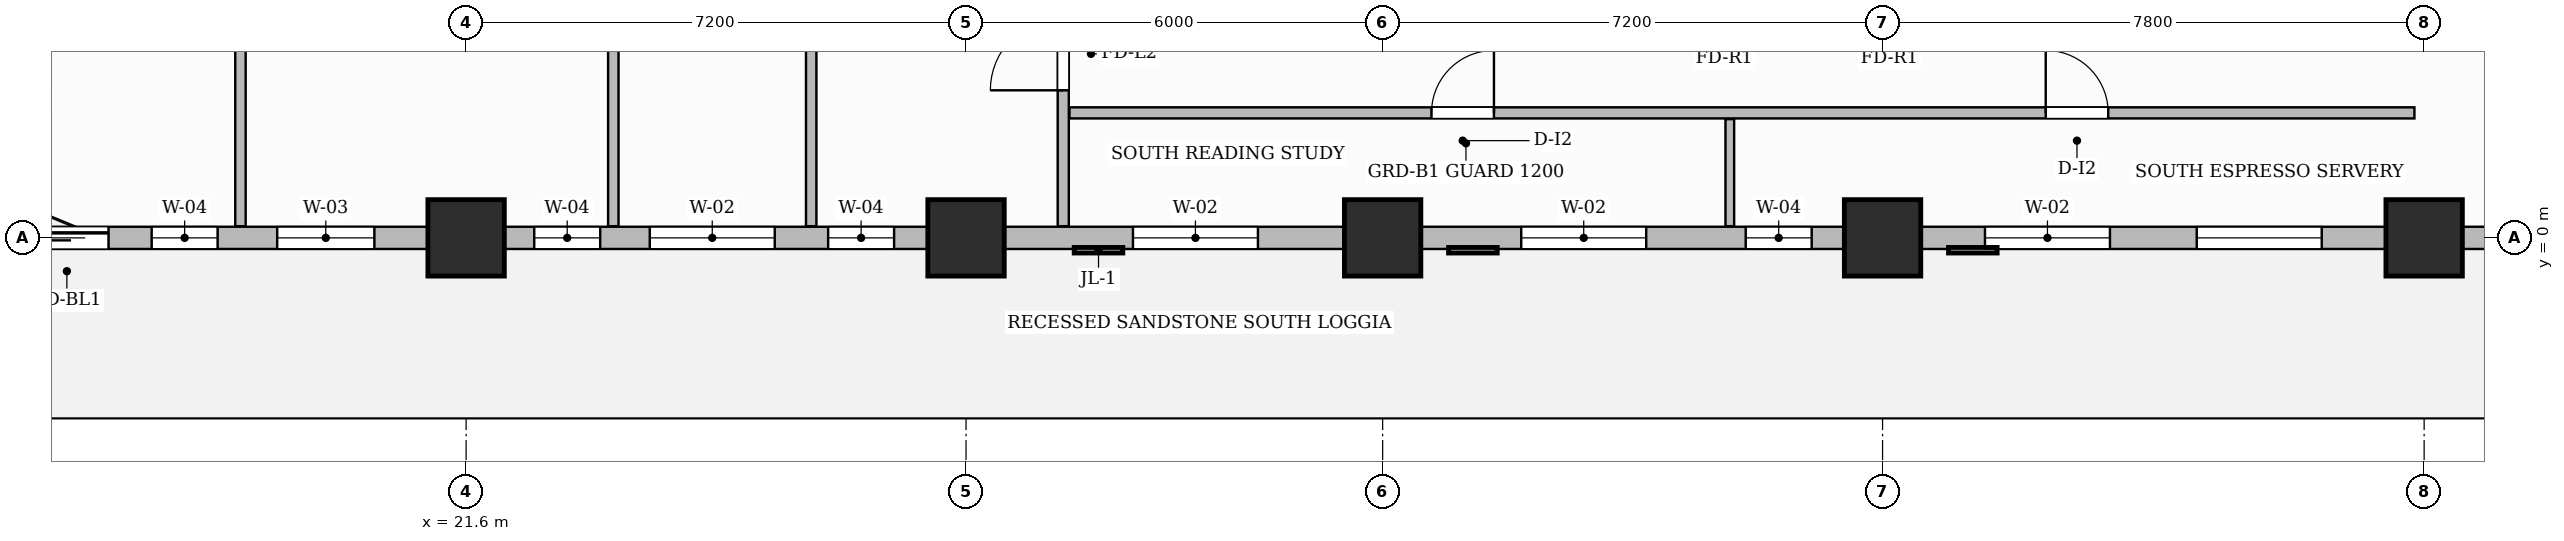
"""IFC4 building model, lengths in metres.
Left out: names, types, materials, properties, quantities, classifications, styles, units other than length and angle.
Written with IfcOpenShell. Run it as: python <this file> out.ifc"""

import sys

from ifc_helpers import new_model, si_unit, direction, frame, frame_2d, origin, origin_2d, place, context, subcontext, project, spatial, rectangle, extrude, source, transform, mapped, element, fill, save


model = new_model("IFC4")
c1 = context("Model", 3, precision=1e-05, world=origin(), true_north=direction((0.0, 1.0)))
c2 = subcontext(c1, "Body", "Model", "MODEL_VIEW")
j1 = project(units=[si_unit("LENGTHUNIT", "METRE"), si_unit("PLANEANGLEUNIT", "RADIAN")], contexts=[c1])
p1 = place(None, origin())
s1 = spatial("IfcSite", under=j1, at=p1, CompositionType="ELEMENT")
p2 = place(p1, origin())
s2 = spatial("IfcBuilding", under=s1, at=p2, CompositionType="ELEMENT")
p3 = place(p2, frame((0.0, 0.0, 69.4)))
s3 = spatial("IfcBuildingStorey", under=s2, at=p3, CompositionType="ELEMENT", Elevation=69.4)
m1 = source(origin(), c2, "Body", "SweptSolid", [
    extrude(rectangle(XDim=1.1, YDim=1.1, at=origin_2d()), origin(), (0.0, 0.0, 1.0), 3.7),
])
for number, where, z_axis, x_axis in (
    (1, (21.6, 0.0, 0.0), (0.0, 0.0, 1.0), (1.0, 0.0, 0.0)),
    (2, (28.8, 0.0, 0.0), (0.0, 0.0, 1.0), (1.0, 0.0, 0.0)),
    (3, (34.8, 0.0, 0.0), (0.0, 0.0, 1.0), (1.0, 0.0, 0.0)),
    (4, (42.0, 0.0, 0.0), (0.0, 0.0, 1.0), (1.0, 0.0, 0.0)),
    (5, (49.8, 0.0, 0.0), (0.0, 0.0, 1.0), (1.0, 0.0, 0.0)),
):
    element("IfcColumn", number, at=place(p3, frame(where, z_axis=z_axis, x_axis=x_axis)), inside=s3, PredefinedType="COLUMN", context=c2, shape_type="MappedRepresentation", body=[
        mapped(m1, transform((0.0, 0.0, 0.0), scale=1.0)),
    ])
p4 = place(p3, frame((30.2, 0.168, 0.0), z_axis=(0.0, 0.0, 1.0), x_axis=(0.0, 1.0, 0.0)))
e6 = element("IfcWall", 6, at=p4, inside=s3, PredefinedType="PARTITIONING", context=c2, shape_type="SweptSolid", body=[
    extrude(rectangle(XDim=9.892, YDim=0.16, at=frame_2d((4.946, 0.0))), origin(), (0.0, 0.0, 1.0), 3.45),
])
p5 = place(p4, frame((1.957, 0.0, 0.0)))
e7 = element("IfcOpeningElement", 7, at=p5, cuts=e6, PredefinedType="OPENING", context=c2, shape_type="SweptSolid", body=[
    extrude(rectangle(XDim=1.05, YDim=2.15, at=frame_2d((0.525, 1.075))), frame((0.0, 0.09, 0.0), z_axis=(0.0, -1.0, 0.0), x_axis=(1.0, 0.0, 0.0)), (0.0, 0.0, 1.0), 0.18),
])
p6 = place(p3, frame((30.29, 1.8, 0.0), z_axis=(0.0, 0.0, 1.0), x_axis=(1.0, 0.0, 0.0)))
e8 = element("IfcWall", 8, at=p6, inside=s3, PredefinedType="PARTITIONING", context=c2, shape_type="SweptSolid", body=[
    extrude(rectangle(XDim=19.37, YDim=0.16, at=frame_2d((9.685, 0.0))), origin(), (0.0, 0.0, 1.0), 3.45),
])
p7 = place(p6, frame((5.213, 0.0, 0.0)))
e9 = element("IfcOpeningElement", 9, at=p7, cuts=e8, PredefinedType="OPENING", context=c2, shape_type="SweptSolid", body=[
    extrude(rectangle(XDim=0.9, YDim=2.15, at=frame_2d((0.45, 1.075))), frame((0.0, 0.09, 0.0), z_axis=(0.0, -1.0, 0.0), x_axis=(1.0, 0.0, 0.0)), (0.0, 0.0, 1.0), 0.18),
])
p8 = place(p6, frame((14.06, 0.0, 0.0)))
e10 = element("IfcOpeningElement", 10, at=p8, cuts=e8, PredefinedType="OPENING", context=c2, shape_type="SweptSolid", body=[
    extrude(rectangle(XDim=0.9, YDim=2.15, at=frame_2d((0.45, 1.075))), frame((0.0, 0.09, 0.0), z_axis=(0.0, -1.0, 0.0), x_axis=(1.0, 0.0, 0.0)), (0.0, 0.0, 1.0), 0.18),
])
p9 = place(p3, frame((39.8, 0.168, 0.0), z_axis=(0.0, 0.0, 1.0), x_axis=(0.0, 1.0, 0.0)))
e11 = element("IfcWall", 11, at=p9, inside=s3, PredefinedType="PARTITIONING", context=c2, shape_type="SweptSolid", body=[
    extrude(rectangle(XDim=1.542, YDim=0.125, at=frame_2d((0.771, 0.0))), origin(), (0.0, 0.0, 1.0), 3.45),
])
for number, where, z_axis, x_axis in (
    (12, (18.35, 0.168, 0.0), (0.0, 0.0, 1.0), (0.0, 1.0, 0.0)),
    (13, (23.72, 0.168, 0.0), (0.0, 0.0, 1.0), (0.0, 1.0, 0.0)),
    (14, (26.57, 0.168, 0.0), (0.0, 0.0, 1.0), (0.0, 1.0, 0.0)),
):
    element("IfcWall", number, at=place(p3, frame(where, z_axis=z_axis, x_axis=x_axis)), inside=s3, PredefinedType="PARTITIONING", context=c2, shape_type="SweptSolid", body=[
        extrude(rectangle(XDim=9.892, YDim=0.15, at=frame_2d((4.946, 0.0))), origin(), (0.0, 0.0, 1.0), 3.45),
    ])
p10 = place(p3, frame((14.4, 0.0, 0.0), z_axis=(0.0, 0.0, 1.0), x_axis=(1.0, 0.0, 0.0)))
e15 = element("IfcWall", 15, at=p10, inside=s3, PredefinedType="SOLIDWALL", context=c2, shape_type="SweptSolid", body=[
    extrude(rectangle(XDim=43.2, YDim=0.32, at=frame_2d((21.6, 0.0))), origin(), (0.0, 0.0, 1.0), 2.885),
])
p11 = place(p10, frame((0.85, 0.0, 0.0)))
e16 = element("IfcOpeningElement", 16, at=p11, cuts=e15, PredefinedType="OPENING", context=c2, shape_type="SweptSolid", body=[
    extrude(rectangle(XDim=1.2, YDim=2.2, at=frame_2d((0.6, 1.1))), frame((0.0, 0.17, 0.0), z_axis=(0.0, -1.0, 0.0), x_axis=(1.0, 0.0, 0.0)), (0.0, 0.0, 1.0), 0.34),
])
p12 = place(p10, frame((2.671, 0.0, 0.8)))
e17 = element("IfcOpeningElement", 17, at=p12, cuts=e15, PredefinedType="OPENING", context=c2, shape_type="SweptSolid", body=[
    extrude(rectangle(XDim=0.95, YDim=1.75, at=frame_2d((0.475, 0.875))), frame((0.0, 0.17, 0.0), z_axis=(0.0, -1.0, 0.0), x_axis=(1.0, 0.0, 0.0)), (0.0, 0.0, 1.0), 0.34),
])
p13 = place(p10, frame((4.479, 0.0, 0.8)))
e18 = element("IfcOpeningElement", 18, at=p13, cuts=e15, PredefinedType="OPENING", context=c2, shape_type="SweptSolid", body=[
    extrude(rectangle(XDim=1.4, YDim=1.85, at=frame_2d((0.7, 0.925))), frame((0.0, 0.17, 0.0), z_axis=(0.0, -1.0, 0.0), x_axis=(1.0, 0.0, 0.0)), (0.0, 0.0, 1.0), 0.34),
])
p14 = place(p10, frame((8.181, 0.0, 0.8)))
e19 = element("IfcOpeningElement", 19, at=p14, cuts=e15, PredefinedType="OPENING", context=c2, shape_type="SweptSolid", body=[
    extrude(rectangle(XDim=0.95, YDim=1.75, at=frame_2d((0.475, 0.875))), frame((0.0, 0.17, 0.0), z_axis=(0.0, -1.0, 0.0), x_axis=(1.0, 0.0, 0.0)), (0.0, 0.0, 1.0), 0.34),
])
p15 = place(p10, frame((9.845, 0.0, 0.8)))
e20 = element("IfcOpeningElement", 20, at=p15, cuts=e15, PredefinedType="OPENING", context=c2, shape_type="SweptSolid", body=[
    extrude(rectangle(XDim=1.8, YDim=1.85, at=frame_2d((0.9, 0.925))), frame((0.0, 0.17, 0.0), z_axis=(0.0, -1.0, 0.0), x_axis=(1.0, 0.0, 0.0)), (0.0, 0.0, 1.0), 0.34),
])
p16 = place(p10, frame((12.414, 0.0, 0.8)))
e21 = element("IfcOpeningElement", 21, at=p16, cuts=e15, PredefinedType="OPENING", context=c2, shape_type="SweptSolid", body=[
    extrude(rectangle(XDim=0.95, YDim=1.75, at=frame_2d((0.475, 0.875))), frame((0.0, 0.17, 0.0), z_axis=(0.0, -1.0, 0.0), x_axis=(1.0, 0.0, 0.0)), (0.0, 0.0, 1.0), 0.34),
])
p17 = place(p10, frame((16.804, 0.0, 0.8)))
e22 = element("IfcOpeningElement", 22, at=p17, cuts=e15, PredefinedType="OPENING", context=c2, shape_type="SweptSolid", body=[
    extrude(rectangle(XDim=1.8, YDim=1.85, at=frame_2d((0.9, 0.925))), frame((0.0, 0.17, 0.0), z_axis=(0.0, -1.0, 0.0), x_axis=(1.0, 0.0, 0.0)), (0.0, 0.0, 1.0), 0.34),
])
p18 = place(p10, frame((22.396, 0.0, 0.8)))
e23 = element("IfcOpeningElement", 23, at=p18, cuts=e15, PredefinedType="OPENING", context=c2, shape_type="SweptSolid", body=[
    extrude(rectangle(XDim=1.8, YDim=1.85, at=frame_2d((0.9, 0.925))), frame((0.0, 0.17, 0.0), z_axis=(0.0, -1.0, 0.0), x_axis=(1.0, 0.0, 0.0)), (0.0, 0.0, 1.0), 0.34),
])
p19 = place(p10, frame((25.629, 0.0, 0.8)))
e24 = element("IfcOpeningElement", 24, at=p19, cuts=e15, PredefinedType="OPENING", context=c2, shape_type="SweptSolid", body=[
    extrude(rectangle(XDim=0.95, YDim=1.75, at=frame_2d((0.475, 0.875))), frame((0.0, 0.17, 0.0), z_axis=(0.0, -1.0, 0.0), x_axis=(1.0, 0.0, 0.0)), (0.0, 0.0, 1.0), 0.34),
])
p20 = place(p10, frame((29.075, 0.0, 0.8)))
e25 = element("IfcOpeningElement", 25, at=p20, cuts=e15, PredefinedType="OPENING", context=c2, shape_type="SweptSolid", body=[
    extrude(rectangle(XDim=1.8, YDim=1.85, at=frame_2d((0.9, 0.925))), frame((0.0, 0.17, 0.0), z_axis=(0.0, -1.0, 0.0), x_axis=(1.0, 0.0, 0.0)), (0.0, 0.0, 1.0), 0.34),
])
p21 = place(p10, frame((32.125, 0.0, 0.8)))
e26 = element("IfcOpeningElement", 26, at=p21, cuts=e15, PredefinedType="OPENING", context=c2, shape_type="SweptSolid", body=[
    extrude(rectangle(XDim=1.8, YDim=1.85, at=frame_2d((0.9, 0.925))), frame((0.0, 0.17, 0.0), z_axis=(0.0, -1.0, 0.0), x_axis=(1.0, 0.0, 0.0)), (0.0, 0.0, 1.0), 0.34),
])
p22 = place(p10, frame((36.946, 0.0, 0.8)))
e27 = element("IfcOpeningElement", 27, at=p22, cuts=e15, PredefinedType="OPENING", context=c2, shape_type="SweptSolid", body=[
    extrude(rectangle(XDim=1.8, YDim=1.85, at=frame_2d((0.9, 0.925))), frame((0.0, 0.17, 0.0), z_axis=(0.0, -1.0, 0.0), x_axis=(1.0, 0.0, 0.0)), (0.0, 0.0, 1.0), 0.34),
])
p23 = place(p10, frame((40.054, 0.0, 0.8)))
e28 = element("IfcOpeningElement", 28, at=p23, cuts=e15, PredefinedType="OPENING", context=c2, shape_type="SweptSolid", body=[
    extrude(rectangle(XDim=1.8, YDim=1.85, at=frame_2d((0.9, 0.925))), frame((0.0, 0.17, 0.0), z_axis=(0.0, -1.0, 0.0), x_axis=(1.0, 0.0, 0.0)), (0.0, 0.0, 1.0), 0.34),
])
m2 = source(origin(), c2, "Body", "SweptSolid", [
    extrude(rectangle(XDim=1.05, YDim=2.15, at=frame_2d((0.525, 1.075))), frame((0.0, 0.025, 0.0), z_axis=(0.0, -1.0, 0.0), x_axis=(1.0, 0.0, 0.0)), (0.0, 0.0, 1.0), 0.05),
])
p24 = place(p5, origin())
e29 = element("IfcDoor", 29, at=p24, inside=s3, OperationType="SINGLE_SWING_LEFT", PredefinedType="DOOR", context=c2, shape_type="MappedRepresentation", body=[
    mapped(m2, transform((0.0, 0.0, 0.0), scale=1.0)),
])
fill(e7, e29)
m3 = source(origin(), c2, "Body", "SweptSolid", [
    extrude(rectangle(XDim=0.9, YDim=2.15, at=frame_2d((0.45, 1.075))), frame((0.0, 0.025, 0.0), z_axis=(0.0, -1.0, 0.0), x_axis=(1.0, 0.0, 0.0)), (0.0, 0.0, 1.0), 0.05),
])
p25 = place(p7, origin())
e30 = element("IfcDoor", 30, at=p25, inside=s3, OperationType="SINGLE_SWING_RIGHT", PredefinedType="DOOR", context=c2, shape_type="MappedRepresentation", body=[
    mapped(m3, transform((0.0, 0.0, 0.0), scale=1.0)),
])
fill(e9, e30)
p26 = place(p8, origin())
e31 = element("IfcDoor", 31, at=p26, inside=s3, OperationType="SINGLE_SWING_LEFT", PredefinedType="DOOR", context=c2, shape_type="MappedRepresentation", body=[
    mapped(m3, transform((0.0, 0.0, 0.0), scale=1.0)),
])
fill(e10, e31)
m4 = source(origin(), c2, "Body", "SweptSolid", [
    extrude(rectangle(XDim=1.2, YDim=2.2, at=frame_2d((0.6, 1.1))), frame((0.0, 0.025, 0.0), z_axis=(0.0, -1.0, 0.0), x_axis=(1.0, 0.0, 0.0)), (0.0, 0.0, 1.0), 0.05),
])
p27 = place(p11, origin())
e32 = element("IfcDoor", 32, at=p27, inside=s3, OperationType="SLIDING_TO_LEFT", PredefinedType="DOOR", context=c2, shape_type="MappedRepresentation", body=[
    mapped(m4, transform((0.0, 0.0, 0.0), scale=1.0)),
])
fill(e16, e32)
m5 = source(origin(), c2, "Body", "SweptSolid", [
    extrude(rectangle(XDim=0.95, YDim=1.75, at=frame_2d((0.475, 0.875))), frame((0.0, 0.03, 0.0), z_axis=(0.0, -1.0, 0.0), x_axis=(1.0, 0.0, 0.0)), (0.0, 0.0, 1.0), 0.06),
])
p28 = place(p12, origin())
e33 = element("IfcWindow", 33, at=p28, inside=s3, PartitioningType="SINGLE_PANEL", PredefinedType="WINDOW", context=c2, shape_type="MappedRepresentation", body=[
    mapped(m5, transform((0.0, 0.0, 0.0), scale=1.0)),
])
fill(e17, e33)
m6 = source(origin(), c2, "Body", "SweptSolid", [
    extrude(rectangle(XDim=1.4, YDim=1.85, at=frame_2d((0.7, 0.925))), frame((0.0, 0.03, 0.0), z_axis=(0.0, -1.0, 0.0), x_axis=(1.0, 0.0, 0.0)), (0.0, 0.0, 1.0), 0.06),
])
p29 = place(p13, origin())
e34 = element("IfcWindow", 34, at=p29, inside=s3, PartitioningType="SINGLE_PANEL", PredefinedType="WINDOW", context=c2, shape_type="MappedRepresentation", body=[
    mapped(m6, transform((0.0, 0.0, 0.0), scale=1.0)),
])
fill(e18, e34)
p30 = place(p14, origin())
e35 = element("IfcWindow", 35, at=p30, inside=s3, PartitioningType="SINGLE_PANEL", PredefinedType="WINDOW", context=c2, shape_type="MappedRepresentation", body=[
    mapped(m5, transform((0.0, 0.0, 0.0), scale=1.0)),
])
fill(e19, e35)
m7 = source(origin(), c2, "Body", "SweptSolid", [
    extrude(rectangle(XDim=1.8, YDim=1.85, at=frame_2d((0.9, 0.925))), frame((0.0, 0.03, 0.0), z_axis=(0.0, -1.0, 0.0), x_axis=(1.0, 0.0, 0.0)), (0.0, 0.0, 1.0), 0.06),
])
p31 = place(p15, origin())
e36 = element("IfcWindow", 36, at=p31, inside=s3, PartitioningType="DOUBLE_PANEL_VERTICAL", PredefinedType="WINDOW", context=c2, shape_type="MappedRepresentation", body=[
    mapped(m7, transform((0.0, 0.0, 0.0), scale=1.0)),
])
fill(e20, e36)
p32 = place(p16, origin())
e37 = element("IfcWindow", 37, at=p32, inside=s3, PartitioningType="SINGLE_PANEL", PredefinedType="WINDOW", context=c2, shape_type="MappedRepresentation", body=[
    mapped(m5, transform((0.0, 0.0, 0.0), scale=1.0)),
])
fill(e21, e37)
p33 = place(p17, origin())
e38 = element("IfcWindow", 38, at=p33, inside=s3, PartitioningType="DOUBLE_PANEL_VERTICAL", PredefinedType="WINDOW", context=c2, shape_type="MappedRepresentation", body=[
    mapped(m7, transform((0.0, 0.0, 0.0), scale=1.0)),
])
fill(e22, e38)
p34 = place(p18, origin())
e39 = element("IfcWindow", 39, at=p34, inside=s3, PartitioningType="DOUBLE_PANEL_VERTICAL", PredefinedType="WINDOW", context=c2, shape_type="MappedRepresentation", body=[
    mapped(m7, transform((0.0, 0.0, 0.0), scale=1.0)),
])
fill(e23, e39)
p35 = place(p19, origin())
e40 = element("IfcWindow", 40, at=p35, inside=s3, PartitioningType="SINGLE_PANEL", PredefinedType="WINDOW", context=c2, shape_type="MappedRepresentation", body=[
    mapped(m5, transform((0.0, 0.0, 0.0), scale=1.0)),
])
fill(e24, e40)
p36 = place(p20, origin())
e41 = element("IfcWindow", 41, at=p36, inside=s3, PartitioningType="DOUBLE_PANEL_VERTICAL", PredefinedType="WINDOW", context=c2, shape_type="MappedRepresentation", body=[
    mapped(m7, transform((0.0, 0.0, 0.0), scale=1.0)),
])
fill(e25, e41)
p37 = place(p21, origin())
e42 = element("IfcWindow", 42, at=p37, inside=s3, PartitioningType="DOUBLE_PANEL_VERTICAL", PredefinedType="WINDOW", context=c2, shape_type="MappedRepresentation", body=[
    mapped(m7, transform((0.0, 0.0, 0.0), scale=1.0)),
])
fill(e26, e42)
save(model, sys.argv[1])
